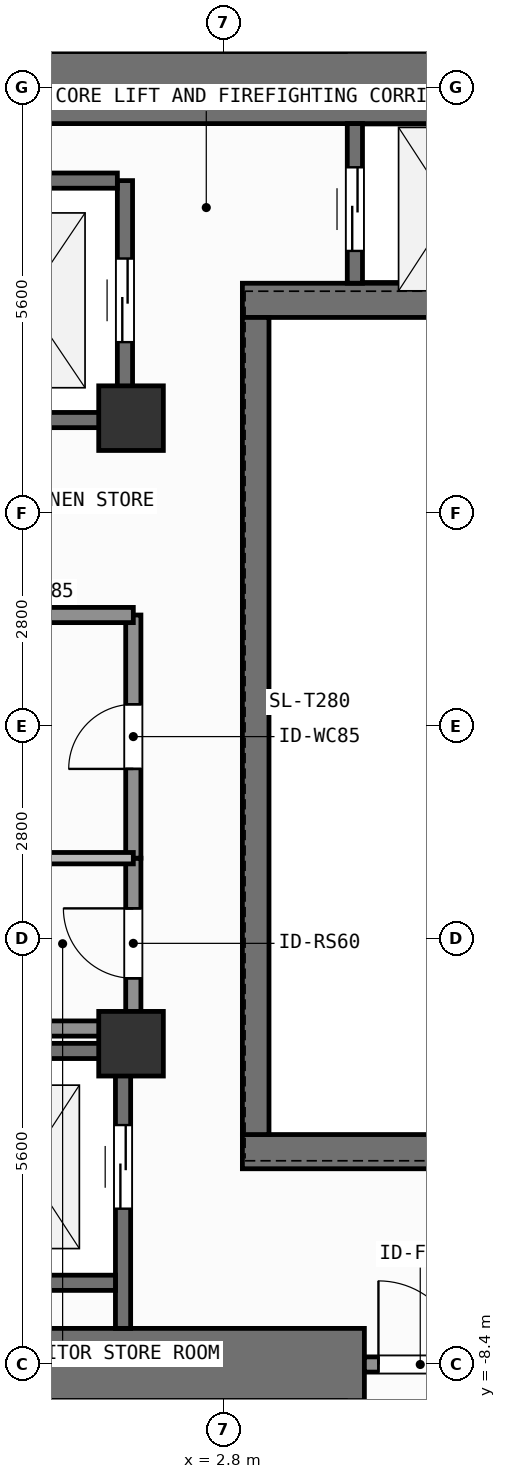
"""IFC4 building model, lengths in metres.
Left out: names, types, materials, properties, quantities, classifications, styles, units other than length and angle.
Written with IfcOpenShell. Run it as: python <this file> out.ifc"""

import sys

from ifc_helpers import new_model, si_unit, direction, frame, frame_2d, origin, origin_2d, place, context, subcontext, project, spatial, rectangle, extrude, element, fill, save


model = new_model("IFC4")
c1 = context("Model", 3, precision=1e-05, world=origin(), true_north=direction((0.0, 1.0)))
c2 = subcontext(c1, "Body", "Model", "MODEL_VIEW")
j1 = project(units=[si_unit("LENGTHUNIT", "METRE"), si_unit("PLANEANGLEUNIT", "RADIAN")], contexts=[c1])
p1 = place(None, origin())
s1 = spatial("IfcSite", under=j1, at=p1, CompositionType="ELEMENT")
p2 = place(p1, origin())
s2 = spatial("IfcBuilding", under=s1, at=p2, CompositionType="ELEMENT")
p3 = place(p2, frame((0.0, 0.0, 136.8)))
s3 = spatial("IfcBuildingStorey", under=s2, at=p3, CompositionType="ELEMENT", Elevation=136.8)
p4 = place(p3, frame((-2.62, -8.4, 0.0), z_axis=(0.0, 0.0, 1.0), x_axis=(1.0, 0.0, 0.0)))
e1 = element("IfcWall", 1, at=p4, inside=s3, PredefinedType="SHEAR", context=c2, shape_type="SweptSolid", body=[
    extrude(rectangle(XDim=7.27, YDim=0.95, at=frame_2d((3.635, 0.0))), origin(), (0.0, 0.0, 1.0), 3.9),
])
p5 = place(p3, frame((-7.55, 8.4, 0.0), z_axis=(0.0, 0.0, 1.0), x_axis=(1.0, 0.0, 0.0)))
e2 = element("IfcWall", 2, at=p5, inside=s3, PredefinedType="SHEAR", context=c2, shape_type="SweptSolid", body=[
    extrude(rectangle(XDim=16.425, YDim=0.95, at=frame_2d((8.212, 0.0))), origin(), (0.0, 0.0, 1.0), 3.9),
])
for number, where, z_axis, x_axis in (
    (3, (3.045, -5.6, 0.0), (0.0, 0.0, 1.0), (1.0, 0.0, 0.0)),
    (4, (3.045, 5.6, 0.0), (0.0, 0.0, 1.0), (1.0, 0.0, 0.0)),
):
    element("IfcWall", number, at=place(p3, frame(where, z_axis=z_axis, x_axis=x_axis)), inside=s3, PredefinedType="SHEAR", context=c2, shape_type="SweptSolid", body=[
        extrude(rectangle(XDim=5.83, YDim=0.45, at=frame_2d((2.915, 0.0))), origin(), (0.0, 0.0, 1.0), 3.9),
    ])
p6 = place(p3, frame((3.22, -5.375, 0.0), z_axis=(0.0, 0.0, 1.0), x_axis=(0.0, 1.0, 0.0)))
e5 = element("IfcWall", 5, at=p6, inside=s3, PredefinedType="SHEAR", context=c2, shape_type="SweptSolid", body=[
    extrude(rectangle(XDim=10.75, YDim=0.35, at=frame_2d((5.375, 0.0))), origin(), (0.0, 0.0, 1.0), 3.9),
])
for number, where, z_axis, x_axis in (
    (6, (1.58, -4.18, 0.0), (0.0, 0.0, 1.0), (1.0, 0.0, 0.0)),
    (7, (1.58, 4.05, 0.0), (0.0, 0.0, 1.0), (1.0, 0.0, 0.0)),
):
    element("IfcColumn", number, at=place(p3, frame(where, z_axis=z_axis, x_axis=x_axis)), inside=s3, PredefinedType="COLUMN", context=c2, shape_type="SweptSolid", body=[
        extrude(rectangle(XDim=0.85, YDim=0.85, at=origin_2d()), origin(), (0.0, 0.0, 1.0), 3.9),
    ])
p7 = place(p3, frame((1.5, 4.025, 0.0), z_axis=(0.0, 0.0, 1.0), x_axis=(0.0, 1.0, 0.0)))
e8 = element("IfcWall", 8, at=p7, inside=s3, PredefinedType="SHEAR", context=c2, shape_type="SweptSolid", body=[
    extrude(rectangle(XDim=3.15, YDim=0.2, at=frame_2d((1.575, 0.0))), origin(), (0.0, 0.0, 1.0), 3.68),
])
p8 = place(p7, frame((1.025, 0.0, 0.0)))
e9 = element("IfcOpeningElement", 9, at=p8, cuts=e8, PredefinedType="OPENING", context=c2, shape_type="SweptSolid", body=[
    extrude(rectangle(XDim=1.1, YDim=2.2, at=frame_2d((0.55, 1.1))), frame((0.0, 0.11, 0.0), z_axis=(0.0, -1.0, 0.0), x_axis=(1.0, 0.0, 0.0)), (0.0, 0.0, 1.0), 0.22),
])
for number, where, z_axis, x_axis in (
    (10, (-1.0, 4.025, 0.0), (0.0, 0.0, 1.0), (1.0, 0.0, 0.0)),
    (11, (-1.0, 7.175, 0.0), (0.0, 0.0, 1.0), (1.0, 0.0, 0.0)),
):
    element("IfcWall", number, at=place(p3, frame(where, z_axis=z_axis, x_axis=x_axis)), inside=s3, PredefinedType="SHEAR", context=c2, shape_type="SweptSolid", body=[
        extrude(rectangle(XDim=2.4, YDim=0.2, at=frame_2d((1.2, 0.0))), origin(), (0.0, 0.0, 1.0), 3.68),
    ])
p9 = place(p3, frame((1.475, -7.925, 0.0), z_axis=(0.0, 0.0, 1.0), x_axis=(0.0, 1.0, 0.0)))
e12 = element("IfcWall", 12, at=p9, inside=s3, PredefinedType="SHEAR", context=c2, shape_type="SweptSolid", body=[
    extrude(rectangle(XDim=3.65, YDim=0.2, at=frame_2d((1.825, 0.0))), origin(), (0.0, 0.0, 1.0), 3.68),
])
p10 = place(p9, frame((1.575, 0.0, 0.0)))
e13 = element("IfcOpeningElement", 13, at=p10, cuts=e12, PredefinedType="OPENING", context=c2, shape_type="SweptSolid", body=[
    extrude(rectangle(XDim=1.1, YDim=2.2, at=frame_2d((0.55, 1.1))), frame((0.0, 0.11, 0.0), z_axis=(0.0, -1.0, 0.0), x_axis=(1.0, 0.0, 0.0)), (0.0, 0.0, 1.0), 0.22),
])
for number, where, z_axis, x_axis in (
    (14, (-0.975, -7.325, 0.0), (0.0, 0.0, 1.0), (1.0, 0.0, 0.0)),
    (15, (-0.975, -4.275, 0.0), (0.0, 0.0, 1.0), (1.0, 0.0, 0.0)),
):
    element("IfcWall", number, at=place(p3, frame(where, z_axis=z_axis, x_axis=x_axis)), inside=s3, PredefinedType="SHEAR", context=c2, shape_type="SweptSolid", body=[
        extrude(rectangle(XDim=2.35, YDim=0.2, at=frame_2d((1.175, 0.0))), origin(), (0.0, 0.0, 1.0), 3.68),
    ])
p11 = place(p3, frame((4.525, 5.825, 0.0), z_axis=(0.0, 0.0, 1.0), x_axis=(0.0, 1.0, 0.0)))
e16 = element("IfcWall", 16, at=p11, inside=s3, PredefinedType="SHEAR", context=c2, shape_type="SweptSolid", body=[
    extrude(rectangle(XDim=2.1, YDim=0.2, at=frame_2d((1.05, 0.0))), origin(), (0.0, 0.0, 1.0), 3.68),
])
p12 = place(p11, frame((0.425, 0.0, 0.0)))
e17 = element("IfcOpeningElement", 17, at=p12, cuts=e16, PredefinedType="OPENING", context=c2, shape_type="SweptSolid", body=[
    extrude(rectangle(XDim=1.1, YDim=2.2, at=frame_2d((0.55, 1.1))), frame((0.0, 0.11, 0.0), z_axis=(0.0, -1.0, 0.0), x_axis=(1.0, 0.0, 0.0)), (0.0, 0.0, 1.0), 0.22),
])
p13 = place(p3, frame((4.65, -8.4, 0.0), z_axis=(0.0, 0.0, 1.0), x_axis=(1.0, 0.0, 0.0)))
e18 = element("IfcWall", 18, at=p13, inside=s3, PredefinedType="SOLIDWALL", context=c2, shape_type="SweptSolid", body=[
    extrude(rectangle(XDim=1.47, YDim=0.2, at=frame_2d((0.735, 0.0))), origin(), (0.0, 0.0, 1.0), 2.72),
])
p14 = place(p13, frame((0.185, 0.0, 0.0)))
e19 = element("IfcOpeningElement", 19, at=p14, cuts=e18, PredefinedType="OPENING", context=c2, shape_type="SweptSolid", body=[
    extrude(rectangle(XDim=1.1, YDim=2.15, at=frame_2d((0.55, 1.075))), frame((0.0, 0.11, 0.0), z_axis=(0.0, -1.0, 0.0), x_axis=(1.0, 0.0, 0.0)), (0.0, 0.0, 1.0), 0.22),
])
p15 = place(p3, frame((1.61, -3.98, 0.0), z_axis=(0.0, 0.0, 1.0), x_axis=(0.0, 1.0, 0.0)))
e20 = element("IfcWall", 20, at=p15, inside=s3, PredefinedType="SOLIDWALL", context=c2, shape_type="SweptSolid", body=[
    extrude(rectangle(XDim=2.241, YDim=0.2, at=frame_2d((1.121, 0.0))), origin(), (0.0, 0.0, 1.0), 3.68),
])
p16 = place(p15, frame((0.66, 0.0, 0.0)))
e21 = element("IfcOpeningElement", 21, at=p16, cuts=e20, PredefinedType="OPENING", context=c2, shape_type="SweptSolid", body=[
    extrude(rectangle(XDim=0.92, YDim=2.1, at=frame_2d((0.46, 1.05))), frame((0.0, 0.11, 0.0), z_axis=(0.0, -1.0, 0.0), x_axis=(1.0, 0.0, 0.0)), (0.0, 0.0, 1.0), 0.22),
])
p17 = place(p3, frame((1.61, -1.739, 0.0), z_axis=(0.0, 0.0, 1.0), x_axis=(0.0, 1.0, 0.0)))
e22 = element("IfcWall", 22, at=p17, inside=s3, PredefinedType="SOLIDWALL", context=c2, shape_type="SweptSolid", body=[
    extrude(rectangle(XDim=3.199, YDim=0.2, at=frame_2d((1.6, 0.0))), origin(), (0.0, 0.0, 1.0), 3.68),
])
p18 = place(p17, frame((1.175, 0.0, 0.0)))
e23 = element("IfcOpeningElement", 23, at=p18, cuts=e22, PredefinedType="OPENING", context=c2, shape_type="SweptSolid", body=[
    extrude(rectangle(XDim=0.85, YDim=2.1, at=frame_2d((0.425, 1.05))), frame((0.0, 0.11, 0.0), z_axis=(0.0, -1.0, 0.0), x_axis=(1.0, 0.0, 0.0)), (0.0, 0.0, 1.0), 0.22),
])
for number, where, z_axis, x_axis in (
    (24, (-1.58, -3.98, 0.0), (0.0, 0.0, 1.0), (1.0, 0.0, 0.0)),
    (25, (-1.58, 1.46, 0.0), (0.0, 0.0, 1.0), (1.0, 0.0, 0.0)),
):
    element("IfcWall", number, at=place(p3, frame(where, z_axis=z_axis, x_axis=x_axis)), inside=s3, PredefinedType="SOLIDWALL", context=c2, shape_type="SweptSolid", body=[
        extrude(rectangle(XDim=3.19, YDim=0.2, at=frame_2d((1.595, 0.0))), origin(), (0.0, 0.0, 1.0), 3.68),
    ])
p19 = place(p3, frame((-1.58, -1.739, 0.0), z_axis=(0.0, 0.0, 1.0), x_axis=(1.0, 0.0, 0.0)))
e26 = element("IfcWall", 26, at=p19, inside=s3, PredefinedType="PARTITIONING", context=c2, shape_type="SweptSolid", body=[
    extrude(rectangle(XDim=3.19, YDim=0.15, at=frame_2d((1.595, 0.0))), origin(), (0.0, 0.0, 1.0), 3.68),
])
p20 = place(p8, origin())
e27 = element("IfcDoor", 27, at=p20, inside=s3, OperationType="SLIDING_TO_LEFT", PredefinedType="DOOR", context=c2, shape_type="SweptSolid", body=[
    extrude(rectangle(XDim=1.1, YDim=2.2, at=frame_2d((0.55, 1.1))), frame((0.0, 0.025, 0.0), z_axis=(0.0, -1.0, 0.0), x_axis=(1.0, 0.0, 0.0)), (0.0, 0.0, 1.0), 0.05),
])
fill(e9, e27)
p21 = place(p10, origin())
e28 = element("IfcDoor", 28, at=p21, inside=s3, OperationType="SLIDING_TO_LEFT", PredefinedType="DOOR", context=c2, shape_type="SweptSolid", body=[
    extrude(rectangle(XDim=1.1, YDim=2.2, at=frame_2d((0.55, 1.1))), frame((0.0, 0.025, 0.0), z_axis=(0.0, -1.0, 0.0), x_axis=(1.0, 0.0, 0.0)), (0.0, 0.0, 1.0), 0.05),
])
fill(e13, e28)
p22 = place(p12, origin())
e29 = element("IfcDoor", 29, at=p22, inside=s3, OperationType="SLIDING_TO_LEFT", PredefinedType="DOOR", context=c2, shape_type="SweptSolid", body=[
    extrude(rectangle(XDim=1.1, YDim=2.2, at=frame_2d((0.55, 1.1))), frame((0.0, 0.025, 0.0), z_axis=(0.0, -1.0, 0.0), x_axis=(1.0, 0.0, 0.0)), (0.0, 0.0, 1.0), 0.05),
])
fill(e17, e29)
p23 = place(p14, origin())
e30 = element("IfcDoor", 30, at=p23, inside=s3, OperationType="SINGLE_SWING_LEFT", PredefinedType="DOOR", context=c2, shape_type="SweptSolid", body=[
    extrude(rectangle(XDim=1.1, YDim=2.15, at=frame_2d((0.55, 1.075))), frame((0.0, 0.025, 0.0), z_axis=(0.0, -1.0, 0.0), x_axis=(1.0, 0.0, 0.0)), (0.0, 0.0, 1.0), 0.05),
])
fill(e19, e30)
p24 = place(p16, origin())
e31 = element("IfcDoor", 31, at=p24, inside=s3, OperationType="SINGLE_SWING_RIGHT", PredefinedType="DOOR", context=c2, shape_type="SweptSolid", body=[
    extrude(rectangle(XDim=0.92, YDim=2.1, at=frame_2d((0.46, 1.05))), frame((0.0, 0.025, 0.0), z_axis=(0.0, -1.0, 0.0), x_axis=(1.0, 0.0, 0.0)), (0.0, 0.0, 1.0), 0.05),
])
fill(e21, e31)
p25 = place(p18, origin())
e32 = element("IfcDoor", 32, at=p25, inside=s3, OperationType="SINGLE_SWING_LEFT", PredefinedType="DOOR", context=c2, shape_type="SweptSolid", body=[
    extrude(rectangle(XDim=0.85, YDim=2.1, at=frame_2d((0.425, 1.05))), frame((0.0, 0.025, 0.0), z_axis=(0.0, -1.0, 0.0), x_axis=(1.0, 0.0, 0.0)), (0.0, 0.0, 1.0), 0.05),
])
fill(e23, e32)
save(model, sys.argv[1])
